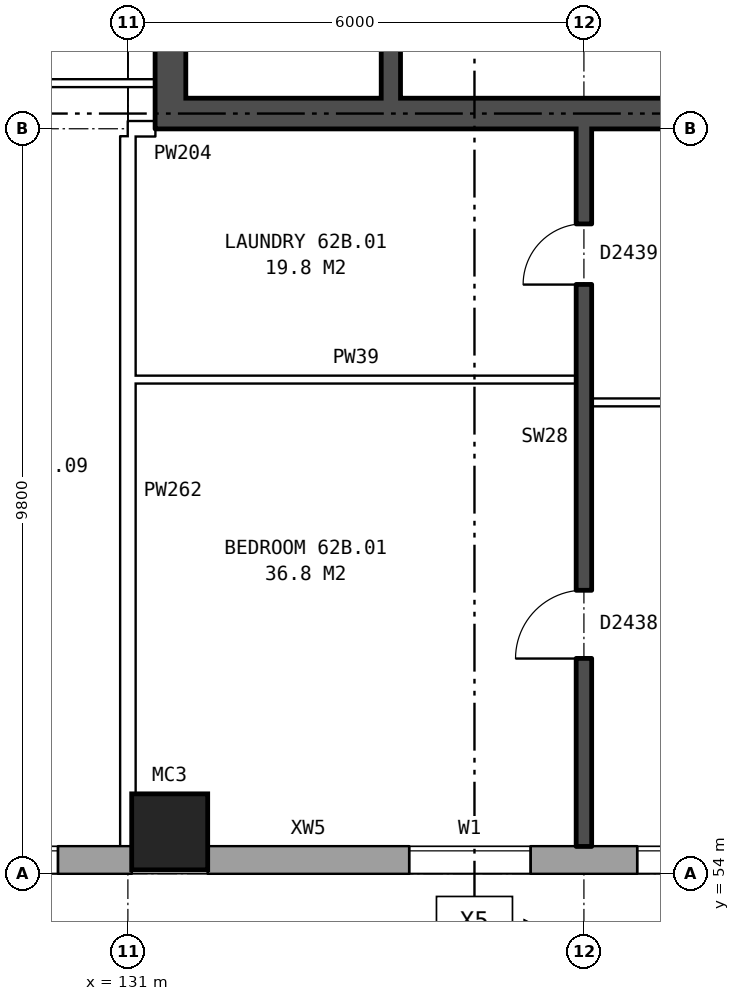
"""IFC4 building model, lengths in metres.
Left out: names, types, materials, properties, quantities, classifications, styles, units other than length and angle.
Written with IfcOpenShell. Run it as: python <this file> out.ifc"""

import sys

from ifc_helpers import new_model, si_unit, direction, frame, frame_2d, origin, origin_2d, place, context, subcontext, project, spatial, rectangle, hollow_rectangle, extrude, element, fill, save


model = new_model("IFC4")
c1 = context("Model", 3, precision=1e-05, world=origin(), true_north=direction((0.0, 1.0)))
c2 = subcontext(c1, "Body", "Model", "MODEL_VIEW")
j1 = project(units=[si_unit("LENGTHUNIT", "METRE"), si_unit("PLANEANGLEUNIT", "RADIAN")], contexts=[c1])
p1 = place(None, origin())
s1 = spatial("IfcSite", under=j1, at=p1, CompositionType="ELEMENT")
p2 = place(p1, origin())
s2 = spatial("IfcBuilding", under=s1, at=p2, CompositionType="ELEMENT")
p3 = place(p2, frame((0.0, 0.0, 221.4)))
s3 = spatial("IfcBuildingStorey", under=s2, at=p3, CompositionType="ELEMENT", Elevation=221.4)
p4 = place(p3, frame((131.55, 54.55, 0.0), z_axis=(0.0, 0.0, 1.0), x_axis=(1.0, 0.0, 0.0)))
e1 = element("IfcColumn", 1, at=p4, inside=s3, PredefinedType="COLUMN", context=c2, shape_type="SweptSolid", body=[
    extrude(hollow_rectangle(XDim=1.0, YDim=1.0, WallThickness=0.055, at=origin_2d()), origin(), (0.0, 0.0, 1.0), 3.1),
])
p5 = place(p3, frame((75.95, 54.18, 0.0), z_axis=(0.0, 0.0, 1.0), x_axis=(1.0, 0.0, 0.0)))
e2 = element("IfcWall", 2, at=p5, inside=s3, PredefinedType="STANDARD", context=c2, shape_type="SweptSolid", body=[
    extrude(rectangle(XDim=55.1, YDim=0.36, at=frame_2d((27.55, 0.0))), origin(), (0.0, 0.0, 1.0), 2.85),
])
p6 = place(p5, frame((0.969, 0.0, 0.8)))
e3 = element("IfcOpeningElement", 3, at=p6, cuts=e2, PredefinedType="OPENING", context=c2, shape_type="SweptSolid", body=[
    extrude(rectangle(XDim=1.6, YDim=1.8, at=frame_2d((0.8, 0.9))), frame((0.0, 0.19, 0.0), z_axis=(0.0, -1.0, 0.0), x_axis=(1.0, 0.0, 0.0)), (0.0, 0.0, 1.0), 0.38),
])
p7 = place(p5, frame((4.406, 0.0, 0.8)))
e4 = element("IfcOpeningElement", 4, at=p7, cuts=e2, PredefinedType="OPENING", context=c2, shape_type="SweptSolid", body=[
    extrude(rectangle(XDim=1.6, YDim=1.8, at=frame_2d((0.8, 0.9))), frame((0.0, 0.19, 0.0), z_axis=(0.0, -1.0, 0.0), x_axis=(1.0, 0.0, 0.0)), (0.0, 0.0, 1.0), 0.38),
])
p8 = place(p5, frame((7.844, 0.0, 0.8)))
e5 = element("IfcOpeningElement", 5, at=p8, cuts=e2, PredefinedType="OPENING", context=c2, shape_type="SweptSolid", body=[
    extrude(rectangle(XDim=1.6, YDim=1.8, at=frame_2d((0.8, 0.9))), frame((0.0, 0.19, 0.0), z_axis=(0.0, -1.0, 0.0), x_axis=(1.0, 0.0, 0.0)), (0.0, 0.0, 1.0), 0.38),
])
p9 = place(p5, frame((11.281, 0.0, 0.8)))
e6 = element("IfcOpeningElement", 6, at=p9, cuts=e2, PredefinedType="OPENING", context=c2, shape_type="SweptSolid", body=[
    extrude(rectangle(XDim=1.6, YDim=1.8, at=frame_2d((0.8, 0.9))), frame((0.0, 0.19, 0.0), z_axis=(0.0, -1.0, 0.0), x_axis=(1.0, 0.0, 0.0)), (0.0, 0.0, 1.0), 0.38),
])
p10 = place(p5, frame((14.719, 0.0, 0.8)))
e7 = element("IfcOpeningElement", 7, at=p10, cuts=e2, PredefinedType="OPENING", context=c2, shape_type="SweptSolid", body=[
    extrude(rectangle(XDim=1.6, YDim=1.8, at=frame_2d((0.8, 0.9))), frame((0.0, 0.19, 0.0), z_axis=(0.0, -1.0, 0.0), x_axis=(1.0, 0.0, 0.0)), (0.0, 0.0, 1.0), 0.38),
])
p11 = place(p5, frame((18.156, 0.0, 0.8)))
e8 = element("IfcOpeningElement", 8, at=p11, cuts=e2, PredefinedType="OPENING", context=c2, shape_type="SweptSolid", body=[
    extrude(rectangle(XDim=1.6, YDim=1.8, at=frame_2d((0.8, 0.9))), frame((0.0, 0.19, 0.0), z_axis=(0.0, -1.0, 0.0), x_axis=(1.0, 0.0, 0.0)), (0.0, 0.0, 1.0), 0.38),
])
p12 = place(p5, frame((21.594, 0.0, 0.8)))
e9 = element("IfcOpeningElement", 9, at=p12, cuts=e2, PredefinedType="OPENING", context=c2, shape_type="SweptSolid", body=[
    extrude(rectangle(XDim=1.6, YDim=1.8, at=frame_2d((0.8, 0.9))), frame((0.0, 0.19, 0.0), z_axis=(0.0, -1.0, 0.0), x_axis=(1.0, 0.0, 0.0)), (0.0, 0.0, 1.0), 0.38),
])
p13 = place(p5, frame((25.031, 0.0, 0.8)))
e10 = element("IfcOpeningElement", 10, at=p13, cuts=e2, PredefinedType="OPENING", context=c2, shape_type="SweptSolid", body=[
    extrude(rectangle(XDim=1.6, YDim=1.8, at=frame_2d((0.8, 0.9))), frame((0.0, 0.19, 0.0), z_axis=(0.0, -1.0, 0.0), x_axis=(1.0, 0.0, 0.0)), (0.0, 0.0, 1.0), 0.38),
])
p14 = place(p5, frame((28.469, 0.0, 0.8)))
e11 = element("IfcOpeningElement", 11, at=p14, cuts=e2, PredefinedType="OPENING", context=c2, shape_type="SweptSolid", body=[
    extrude(rectangle(XDim=1.6, YDim=1.8, at=frame_2d((0.8, 0.9))), frame((0.0, 0.19, 0.0), z_axis=(0.0, -1.0, 0.0), x_axis=(1.0, 0.0, 0.0)), (0.0, 0.0, 1.0), 0.38),
])
p15 = place(p5, frame((31.906, 0.0, 0.8)))
e12 = element("IfcOpeningElement", 12, at=p15, cuts=e2, PredefinedType="OPENING", context=c2, shape_type="SweptSolid", body=[
    extrude(rectangle(XDim=1.6, YDim=1.8, at=frame_2d((0.8, 0.9))), frame((0.0, 0.19, 0.0), z_axis=(0.0, -1.0, 0.0), x_axis=(1.0, 0.0, 0.0)), (0.0, 0.0, 1.0), 0.38),
])
p16 = place(p5, frame((35.344, 0.0, 0.8)))
e13 = element("IfcOpeningElement", 13, at=p16, cuts=e2, PredefinedType="OPENING", context=c2, shape_type="SweptSolid", body=[
    extrude(rectangle(XDim=1.6, YDim=1.8, at=frame_2d((0.8, 0.9))), frame((0.0, 0.19, 0.0), z_axis=(0.0, -1.0, 0.0), x_axis=(1.0, 0.0, 0.0)), (0.0, 0.0, 1.0), 0.38),
])
p17 = place(p5, frame((38.781, 0.0, 0.8)))
e14 = element("IfcOpeningElement", 14, at=p17, cuts=e2, PredefinedType="OPENING", context=c2, shape_type="SweptSolid", body=[
    extrude(rectangle(XDim=1.6, YDim=1.8, at=frame_2d((0.8, 0.9))), frame((0.0, 0.19, 0.0), z_axis=(0.0, -1.0, 0.0), x_axis=(1.0, 0.0, 0.0)), (0.0, 0.0, 1.0), 0.38),
])
p18 = place(p5, frame((42.219, 0.0, 0.8)))
e15 = element("IfcOpeningElement", 15, at=p18, cuts=e2, PredefinedType="OPENING", context=c2, shape_type="SweptSolid", body=[
    extrude(rectangle(XDim=1.6, YDim=1.8, at=frame_2d((0.8, 0.9))), frame((0.0, 0.19, 0.0), z_axis=(0.0, -1.0, 0.0), x_axis=(1.0, 0.0, 0.0)), (0.0, 0.0, 1.0), 0.38),
])
p19 = place(p5, frame((45.656, 0.0, 0.8)))
e16 = element("IfcOpeningElement", 16, at=p19, cuts=e2, PredefinedType="OPENING", context=c2, shape_type="SweptSolid", body=[
    extrude(rectangle(XDim=1.6, YDim=1.8, at=frame_2d((0.8, 0.9))), frame((0.0, 0.19, 0.0), z_axis=(0.0, -1.0, 0.0), x_axis=(1.0, 0.0, 0.0)), (0.0, 0.0, 1.0), 0.38),
])
p20 = place(p5, frame((49.094, 0.0, 0.8)))
e17 = element("IfcOpeningElement", 17, at=p20, cuts=e2, PredefinedType="OPENING", context=c2, shape_type="SweptSolid", body=[
    extrude(rectangle(XDim=1.6, YDim=1.8, at=frame_2d((0.8, 0.9))), frame((0.0, 0.19, 0.0), z_axis=(0.0, -1.0, 0.0), x_axis=(1.0, 0.0, 0.0)), (0.0, 0.0, 1.0), 0.38),
])
p21 = place(p5, frame((52.531, 0.0, 0.8)))
e18 = element("IfcOpeningElement", 18, at=p21, cuts=e2, PredefinedType="OPENING", context=c2, shape_type="SweptSolid", body=[
    extrude(rectangle(XDim=1.6, YDim=1.8, at=frame_2d((0.8, 0.9))), frame((0.0, 0.19, 0.0), z_axis=(0.0, -1.0, 0.0), x_axis=(1.0, 0.0, 0.0)), (0.0, 0.0, 1.0), 0.38),
])
p22 = place(p3, frame((132.05, 54.18, 0.0), z_axis=(0.0, 0.0, 1.0), x_axis=(1.0, 0.0, 0.0)))
e19 = element("IfcWall", 19, at=p22, inside=s3, PredefinedType="STANDARD", context=c2, shape_type="SweptSolid", body=[
    extrude(rectangle(XDim=33.875, YDim=0.36, at=frame_2d((16.938, 0.0))), origin(), (0.0, 0.0, 1.0), 2.85),
])
p23 = place(p22, frame((2.65, 0.0, 0.8)))
e20 = element("IfcOpeningElement", 20, at=p23, cuts=e19, PredefinedType="OPENING", context=c2, shape_type="SweptSolid", body=[
    extrude(rectangle(XDim=1.6, YDim=1.8, at=frame_2d((0.8, 0.9))), frame((0.0, 0.19, 0.0), z_axis=(0.0, -1.0, 0.0), x_axis=(1.0, 0.0, 0.0)), (0.0, 0.0, 1.0), 0.38),
])
p24 = place(p22, frame((5.65, 0.0, 0.8)))
e21 = element("IfcOpeningElement", 21, at=p24, cuts=e19, PredefinedType="OPENING", context=c2, shape_type="SweptSolid", body=[
    extrude(rectangle(XDim=1.6, YDim=1.8, at=frame_2d((0.8, 0.9))), frame((0.0, 0.19, 0.0), z_axis=(0.0, -1.0, 0.0), x_axis=(1.0, 0.0, 0.0)), (0.0, 0.0, 1.0), 0.38),
])
p25 = place(p22, frame((7.55, 0.0, 0.8)))
e22 = element("IfcOpeningElement", 22, at=p25, cuts=e19, PredefinedType="OPENING", context=c2, shape_type="SweptSolid", body=[
    extrude(rectangle(XDim=1.6, YDim=1.8, at=frame_2d((0.8, 0.9))), frame((0.0, 0.19, 0.0), z_axis=(0.0, -1.0, 0.0), x_axis=(1.0, 0.0, 0.0)), (0.0, 0.0, 1.0), 0.38),
])
p26 = place(p22, frame((11.65, 0.0, 0.8)))
e23 = element("IfcOpeningElement", 23, at=p26, cuts=e19, PredefinedType="OPENING", context=c2, shape_type="SweptSolid", body=[
    extrude(rectangle(XDim=1.6, YDim=1.8, at=frame_2d((0.8, 0.9))), frame((0.0, 0.19, 0.0), z_axis=(0.0, -1.0, 0.0), x_axis=(1.0, 0.0, 0.0)), (0.0, 0.0, 1.0), 0.38),
])
p27 = place(p22, frame((14.65, 0.0, 0.8)))
e24 = element("IfcOpeningElement", 24, at=p27, cuts=e19, PredefinedType="OPENING", context=c2, shape_type="SweptSolid", body=[
    extrude(rectangle(XDim=1.6, YDim=1.8, at=frame_2d((0.8, 0.9))), frame((0.0, 0.19, 0.0), z_axis=(0.0, -1.0, 0.0), x_axis=(1.0, 0.0, 0.0)), (0.0, 0.0, 1.0), 0.38),
])
p28 = place(p22, frame((17.65, 0.0, 0.8)))
e25 = element("IfcOpeningElement", 25, at=p28, cuts=e19, PredefinedType="OPENING", context=c2, shape_type="SweptSolid", body=[
    extrude(rectangle(XDim=1.6, YDim=1.8, at=frame_2d((0.8, 0.9))), frame((0.0, 0.19, 0.0), z_axis=(0.0, -1.0, 0.0), x_axis=(1.0, 0.0, 0.0)), (0.0, 0.0, 1.0), 0.38),
])
p29 = place(p22, frame((20.65, 0.0, 0.8)))
e26 = element("IfcOpeningElement", 26, at=p29, cuts=e19, PredefinedType="OPENING", context=c2, shape_type="SweptSolid", body=[
    extrude(rectangle(XDim=1.6, YDim=1.8, at=frame_2d((0.8, 0.9))), frame((0.0, 0.19, 0.0), z_axis=(0.0, -1.0, 0.0), x_axis=(1.0, 0.0, 0.0)), (0.0, 0.0, 1.0), 0.38),
])
p30 = place(p22, frame((23.15, 0.0, 0.8)))
e27 = element("IfcOpeningElement", 27, at=p30, cuts=e19, PredefinedType="OPENING", context=c2, shape_type="SweptSolid", body=[
    extrude(rectangle(XDim=1.0, YDim=1.8, at=frame_2d((0.5, 0.9))), frame((0.0, 0.19, 0.0), z_axis=(0.0, -1.0, 0.0), x_axis=(1.0, 0.0, 0.0)), (0.0, 0.0, 1.0), 0.38),
])
p31 = place(p22, frame((26.65, 0.0, 0.8)))
e28 = element("IfcOpeningElement", 28, at=p31, cuts=e19, PredefinedType="OPENING", context=c2, shape_type="SweptSolid", body=[
    extrude(rectangle(XDim=1.6, YDim=1.8, at=frame_2d((0.8, 0.9))), frame((0.0, 0.19, 0.0), z_axis=(0.0, -1.0, 0.0), x_axis=(1.0, 0.0, 0.0)), (0.0, 0.0, 1.0), 0.38),
])
p32 = place(p22, frame((29.65, 0.0, 0.8)))
e29 = element("IfcOpeningElement", 29, at=p32, cuts=e19, PredefinedType="OPENING", context=c2, shape_type="SweptSolid", body=[
    extrude(rectangle(XDim=1.6, YDim=1.8, at=frame_2d((0.8, 0.9))), frame((0.0, 0.19, 0.0), z_axis=(0.0, -1.0, 0.0), x_axis=(1.0, 0.0, 0.0)), (0.0, 0.0, 1.0), 0.38),
])
p33 = place(p22, frame((9.45, 0.0, 1.7)))
e30 = element("IfcOpeningElement", 30, at=p33, cuts=e19, PredefinedType="OPENING", context=c2, shape_type="SweptSolid", body=[
    extrude(rectangle(XDim=0.6, YDim=0.9, at=frame_2d((0.3, 0.45))), frame((0.0, 0.19, 0.0), z_axis=(0.0, -1.0, 0.0), x_axis=(1.0, 0.0, 0.0)), (0.0, 0.0, 1.0), 0.38),
])
p34 = place(p3, frame((131.56, 63.8, 0.0), z_axis=(0.0, 0.0, 1.0), x_axis=(0.0, 1.0, 0.0)))
e31 = element("IfcWall", 31, at=p34, inside=s3, PredefinedType="SHEAR", context=c2, shape_type="SweptSolid", body=[
    extrude(rectangle(XDim=12.4, YDim=0.4, at=frame_2d((6.2, 0.0))), origin(), (0.0, 0.0, 1.0), 2.85),
])
p35 = place(p34, frame((9.8, 0.0, 0.0)))
e32 = element("IfcOpeningElement", 32, at=p35, cuts=e31, PredefinedType="OPENING", context=c2, shape_type="SweptSolid", body=[
    extrude(rectangle(XDim=1.1, YDim=2.1, at=frame_2d((0.55, 1.05))), frame((0.0, 0.21, 0.0), z_axis=(0.0, -1.0, 0.0), x_axis=(1.0, 0.0, 0.0)), (0.0, 0.0, 1.0), 0.42),
])
p36 = place(p3, frame((139.36, 64.0, 0.0), z_axis=(0.0, 0.0, 1.0), x_axis=(-1.0, 0.0, 0.0)))
e33 = element("IfcWall", 33, at=p36, inside=s3, PredefinedType="SHEAR", context=c2, shape_type="SweptSolid", body=[
    extrude(rectangle(XDim=7.6, YDim=0.4, at=frame_2d((3.8, 0.0))), origin(), (0.0, 0.0, 1.0), 2.85),
])
p37 = place(p3, frame((134.46, 64.2, 0.0), z_axis=(0.0, 0.0, 1.0), x_axis=(0.0, 1.0, 0.0)))
e34 = element("IfcWall", 34, at=p37, inside=s3, PredefinedType="SHEAR", context=c2, shape_type="SweptSolid", body=[
    extrude(rectangle(XDim=6.925, YDim=0.25, at=frame_2d((3.462, 0.0))), origin(), (0.0, 0.0, 1.0), 2.85),
])
p38 = place(p3, frame((137.1, 60.2, 0.0), z_axis=(0.0, 0.0, 1.0), x_axis=(1.0, 0.0, 0.0)))
e35 = element("IfcWall", 35, at=p38, inside=s3, PredefinedType="PARTITIONING", context=c2, shape_type="SweptSolid", body=[
    extrude(rectangle(XDim=5.8, YDim=0.1, at=frame_2d((2.9, 0.0))), origin(), (0.0, 0.0, 1.0), 2.85),
])
p39 = place(p38, frame((1.3, 0.0, 0.0)))
e36 = element("IfcOpeningElement", 36, at=p39, cuts=e35, PredefinedType="OPENING", context=c2, shape_type="SweptSolid", body=[
    extrude(rectangle(XDim=0.9, YDim=2.1, at=frame_2d((0.45, 1.05))), frame((0.0, 0.06, 0.0), z_axis=(0.0, -1.0, 0.0), x_axis=(1.0, 0.0, 0.0)), (0.0, 0.0, 1.0), 0.12),
])
p40 = place(p38, frame((4.2, 0.0, 0.0)))
e37 = element("IfcOpeningElement", 37, at=p40, cuts=e35, PredefinedType="OPENING", context=c2, shape_type="SweptSolid", body=[
    extrude(rectangle(XDim=0.9, YDim=2.1, at=frame_2d((0.45, 1.05))), frame((0.0, 0.06, 0.0), z_axis=(0.0, -1.0, 0.0), x_axis=(1.0, 0.0, 0.0)), (0.0, 0.0, 1.0), 0.12),
])
p41 = place(p3, frame((131.1, 60.5, 0.0), z_axis=(0.0, 0.0, 1.0), x_axis=(1.0, 0.0, 0.0)))
e38 = element("IfcWall", 38, at=p41, inside=s3, PredefinedType="PARTITIONING", context=c2, shape_type="SweptSolid", body=[
    extrude(rectangle(XDim=5.8, YDim=0.1, at=frame_2d((2.9, 0.0))), origin(), (0.0, 0.0, 1.0), 2.85),
])
p42 = place(p3, frame((131.0, 63.8, 0.0), z_axis=(0.0, 0.0, 1.0), x_axis=(1.0, 0.0, 0.0)))
e39 = element("IfcWall", 39, at=p42, inside=s3, PredefinedType="PARTITIONING", context=c2, shape_type="SweptSolid", body=[
    extrude(rectangle(XDim=0.36, YDim=0.2, at=frame_2d((0.18, 0.0))), origin(), (0.0, 0.0, 1.0), 2.85),
])
p43 = place(p3, frame((127.912, 64.4, 0.0), z_axis=(0.0, 0.0, 1.0), x_axis=(1.0, 0.0, 0.0)))
e40 = element("IfcWall", 40, at=p43, inside=s3, PredefinedType="PARTITIONING", context=c2, shape_type="SweptSolid", body=[
    extrude(rectangle(XDim=3.448, YDim=0.1, at=frame_2d((1.724, 0.0))), origin(), (0.0, 0.0, 1.0), 2.85),
])
p44 = place(p3, frame((131.0, 54.36, 0.0), z_axis=(0.0, 0.0, 1.0), x_axis=(0.0, 1.0, 0.0)))
e41 = element("IfcWall", 41, at=p44, inside=s3, PredefinedType="PARTITIONING", context=c2, shape_type="SweptSolid", body=[
    extrude(rectangle(XDim=9.34, YDim=0.2, at=frame_2d((4.67, 0.0))), origin(), (0.0, 0.0, 1.0), 2.85),
])
p45 = place(p3, frame((137.0, 54.36, 0.0), z_axis=(0.0, 0.0, 1.0), x_axis=(0.0, 1.0, 0.0)))
e42 = element("IfcWall", 42, at=p45, inside=s3, PredefinedType="SOLIDWALL", context=c2, shape_type="SweptSolid", body=[
    extrude(rectangle(XDim=9.44, YDim=0.2, at=frame_2d((4.72, 0.0))), origin(), (0.0, 0.0, 1.0), 2.85),
])
p46 = place(p45, frame((2.47, 0.0, 0.0)))
e43 = element("IfcOpeningElement", 43, at=p46, cuts=e42, PredefinedType="OPENING", context=c2, shape_type="SweptSolid", body=[
    extrude(rectangle(XDim=0.9, YDim=2.1, at=frame_2d((0.45, 1.05))), frame((0.0, 0.11, 0.0), z_axis=(0.0, -1.0, 0.0), x_axis=(1.0, 0.0, 0.0)), (0.0, 0.0, 1.0), 0.22),
])
p47 = place(p45, frame((7.39, 0.0, 0.0)))
e44 = element("IfcOpeningElement", 44, at=p47, cuts=e42, PredefinedType="OPENING", context=c2, shape_type="SweptSolid", body=[
    extrude(rectangle(XDim=0.8, YDim=2.1, at=frame_2d((0.4, 1.05))), frame((0.0, 0.11, 0.0), z_axis=(0.0, -1.0, 0.0), x_axis=(1.0, 0.0, 0.0)), (0.0, 0.0, 1.0), 0.22),
])
p48 = place(p21, origin())
e45 = element("IfcWindow", 45, at=p48, inside=s3, PartitioningType="SINGLE_PANEL", PredefinedType="WINDOW", context=c2, shape_type="SweptSolid", body=[
    extrude(rectangle(XDim=1.6, YDim=1.8, at=frame_2d((0.8, 0.9))), frame((0.0, 0.15, 0.0), z_axis=(0.0, -1.0, 0.0), x_axis=(1.0, 0.0, 0.0)), (0.0, 0.0, 1.0), 0.06),
])
fill(e18, e45)
p49 = place(p23, origin())
e46 = element("IfcWindow", 46, at=p49, inside=s3, PartitioningType="SINGLE_PANEL", PredefinedType="WINDOW", context=c2, shape_type="SweptSolid", body=[
    extrude(rectangle(XDim=1.6, YDim=1.8, at=frame_2d((0.8, 0.9))), frame((0.0, 0.15, 0.0), z_axis=(0.0, -1.0, 0.0), x_axis=(1.0, 0.0, 0.0)), (0.0, 0.0, 1.0), 0.06),
])
fill(e20, e46)
p50 = place(p24, origin())
e47 = element("IfcWindow", 47, at=p50, inside=s3, PartitioningType="SINGLE_PANEL", PredefinedType="WINDOW", context=c2, shape_type="SweptSolid", body=[
    extrude(rectangle(XDim=1.6, YDim=1.8, at=frame_2d((0.8, 0.9))), frame((0.0, 0.15, 0.0), z_axis=(0.0, -1.0, 0.0), x_axis=(1.0, 0.0, 0.0)), (0.0, 0.0, 1.0), 0.06),
])
fill(e21, e47)
p51 = place(p46, origin())
e48 = element("IfcDoor", 48, at=p51, inside=s3, OperationType="SINGLE_SWING_LEFT", PredefinedType="DOOR", context=c2, shape_type="SweptSolid", body=[
    extrude(rectangle(XDim=0.9, YDim=2.1, at=frame_2d((0.45, 1.05))), frame((0.0, 0.025, 0.0), z_axis=(0.0, -1.0, 0.0), x_axis=(1.0, 0.0, 0.0)), (0.0, 0.0, 1.0), 0.05),
])
fill(e43, e48)
p52 = place(p47, origin())
e49 = element("IfcDoor", 49, at=p52, inside=s3, OperationType="SINGLE_SWING_LEFT", PredefinedType="DOOR", context=c2, shape_type="SweptSolid", body=[
    extrude(rectangle(XDim=0.8, YDim=2.1, at=frame_2d((0.4, 1.05))), frame((0.0, 0.025, 0.0), z_axis=(0.0, -1.0, 0.0), x_axis=(1.0, 0.0, 0.0)), (0.0, 0.0, 1.0), 0.05),
])
fill(e44, e49)
save(model, sys.argv[1])
